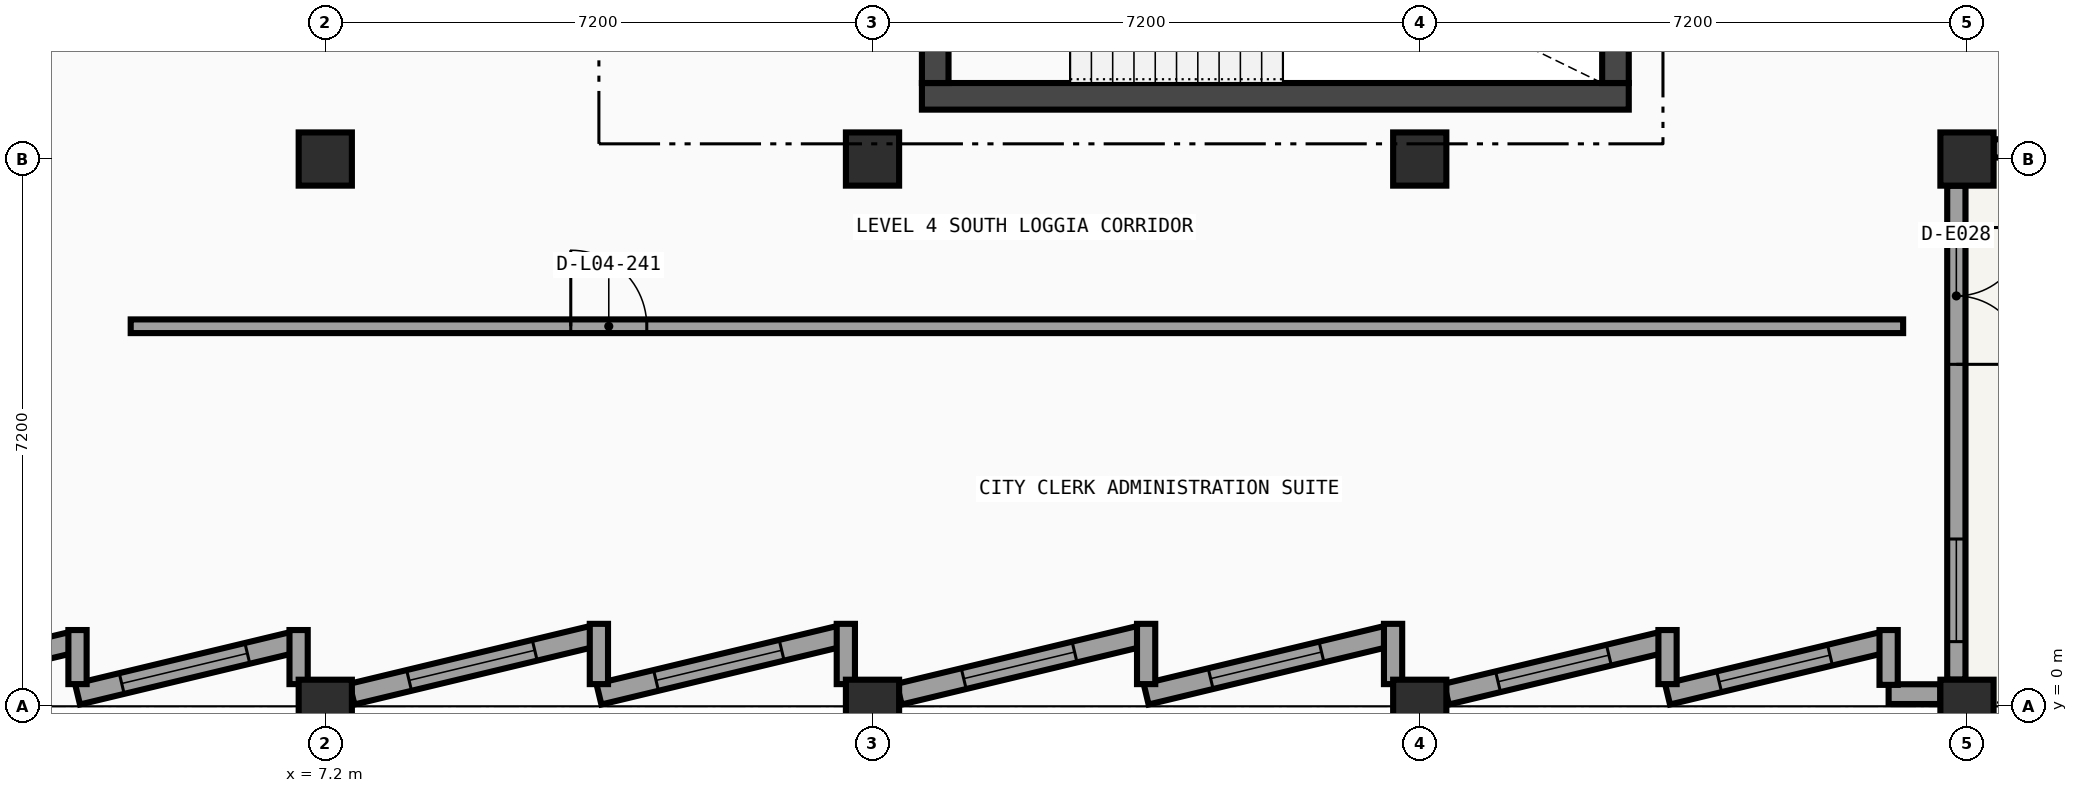
"""IFC4 building model, lengths in metres.
Left out: names, types, materials, properties, quantities, classifications, styles, units other than length and angle.
Written with IfcOpenShell. Run it as: python <this file> out.ifc"""

import sys

from ifc_helpers import new_model, si_unit, direction, frame, frame_2d, origin, origin_2d, place, context, subcontext, project, spatial, rectangle, extrude, element, fill, save


model = new_model("IFC4")
c1 = context("Model", 3, precision=1e-05, world=origin(), true_north=direction((0.0, 1.0)))
c2 = subcontext(c1, "Body", "Model", "MODEL_VIEW")
j1 = project(units=[si_unit("LENGTHUNIT", "METRE"), si_unit("PLANEANGLEUNIT", "RADIAN")], contexts=[c1])
p1 = place(None, origin())
s1 = spatial("IfcSite", under=j1, at=p1, CompositionType="ELEMENT")
p2 = place(p1, origin())
s2 = spatial("IfcBuilding", under=s1, at=p2, CompositionType="ELEMENT")
p3 = place(p2, frame((0.0, 0.0, 18.9)))
s3 = spatial("IfcBuildingStorey", under=s2, at=p3, CompositionType="ELEMENT", Elevation=18.9)
for number, where, z_axis, x_axis in (
    (1, (7.2, 0.0, 0.0), (0.0, 0.0, 1.0), (1.0, 0.0, 0.0)),
    (2, (7.2, 7.2, 0.0), (0.0, 0.0, 1.0), (1.0, 0.0, 0.0)),
    (3, (14.4, 0.0, 0.0), (0.0, 0.0, 1.0), (1.0, 0.0, 0.0)),
    (4, (14.4, 7.2, 0.0), (0.0, 0.0, 1.0), (1.0, 0.0, 0.0)),
    (5, (21.6, 0.0, 0.0), (0.0, 0.0, 1.0), (1.0, 0.0, 0.0)),
    (6, (21.6, 7.2, 0.0), (0.0, 0.0, 1.0), (1.0, 0.0, 0.0)),
    (7, (28.8, 0.0, 0.0), (0.0, 0.0, 1.0), (1.0, 0.0, 0.0)),
    (8, (28.8, 7.2, 0.0), (0.0, 0.0, 1.0), (1.0, 0.0, 0.0)),
):
    element("IfcColumn", number, at=place(p3, frame(where, z_axis=z_axis, x_axis=x_axis)), inside=s3, PredefinedType="COLUMN", context=c2, shape_type="SweptSolid", body=[
        extrude(rectangle(XDim=0.7, YDim=0.7, at=origin_2d()), origin(), (0.0, 0.0, 1.0), 4.05),
    ])
p4 = place(p3, frame((35.897, 7.34, 0.0), z_axis=(0.0, 0.0, 1.0), x_axis=(-1.0, 0.0, 0.0)))
e9 = element("IfcWall", 9, at=p4, inside=s3, PredefinedType="SOLIDWALL", context=c2, shape_type="SweptSolid", body=[
    extrude(rectangle(XDim=6.746, YDim=0.24, at=frame_2d((3.373, 0.0))), origin(), (0.0, 0.0, 1.0), 3.216),
])
p5 = place(p4, frame((0.55, 0.0, 0.0)))
e10 = element("IfcOpeningElement", 10, at=p5, cuts=e9, PredefinedType="OPENING", context=c2, shape_type="SweptSolid", body=[
    extrude(rectangle(XDim=1.8, YDim=2.15, at=frame_2d((0.9, 1.075))), frame((0.0, 0.13, 0.0), z_axis=(0.0, -1.0, 0.0), x_axis=(1.0, 0.0, 0.0)), (0.0, 0.0, 1.0), 0.26),
])
p6 = place(p4, frame((4.896, 0.0, 0.85)))
e11 = element("IfcOpeningElement", 11, at=p6, cuts=e9, PredefinedType="OPENING", context=c2, shape_type="SweptSolid", body=[
    extrude(rectangle(XDim=1.35, YDim=1.85, at=frame_2d((0.675, 0.925))), frame((0.0, 0.13, 0.0), z_axis=(0.0, -1.0, 0.0), x_axis=(1.0, 0.0, 0.0)), (0.0, 0.0, 1.0), 0.26),
])
p7 = place(p3, frame((28.66, 6.849, 0.0), z_axis=(0.0, 0.0, 1.0), x_axis=(0.0, -1.0, 0.0)))
e12 = element("IfcWall", 12, at=p7, inside=s3, PredefinedType="SOLIDWALL", context=c2, shape_type="SweptSolid", body=[
    extrude(rectangle(XDim=6.498, YDim=0.24, at=frame_2d((3.249, 0.0))), origin(), (0.0, 0.0, 1.0), 3.216),
])
p8 = place(p7, frame((0.55, 0.0, 0.0)))
e13 = element("IfcOpeningElement", 13, at=p8, cuts=e12, PredefinedType="OPENING", context=c2, shape_type="SweptSolid", body=[
    extrude(rectangle(XDim=1.8, YDim=2.15, at=frame_2d((0.9, 1.075))), frame((0.0, 0.13, 0.0), z_axis=(0.0, -1.0, 0.0), x_axis=(1.0, 0.0, 0.0)), (0.0, 0.0, 1.0), 0.26),
])
p9 = place(p7, frame((4.648, 0.0, 0.85)))
e14 = element("IfcOpeningElement", 14, at=p9, cuts=e12, PredefinedType="OPENING", context=c2, shape_type="SweptSolid", body=[
    extrude(rectangle(XDim=1.35, YDim=1.85, at=frame_2d((0.675, 0.925))), frame((0.0, 0.13, 0.0), z_axis=(0.0, -1.0, 0.0), x_axis=(1.0, 0.0, 0.0)), (0.0, 0.0, 1.0), 0.26),
])
p10 = place(p3, frame((28.449, 0.16, 0.0), z_axis=(0.0, 0.0, 1.0), x_axis=(-1.0, 0.0, 0.0)))
e15 = element("IfcWall", 15, at=p10, inside=s3, PredefinedType="SOLIDWALL", context=c2, shape_type="SweptSolid", body=[
    extrude(rectangle(XDim=0.68, YDim=0.26, at=frame_2d((0.34, 0.0))), origin(), (0.0, 0.0, 1.0), 3.216),
])
p11 = place(p3, frame((27.677, 0.836, 0.0), z_axis=(0.0, 0.0, 1.0), x_axis=(-0.9723612823, -0.23348134119, 0.0)))
e16 = element("IfcWall", 16, at=p11, inside=s3, PredefinedType="SOLIDWALL", context=c2, shape_type="SweptSolid", body=[
    extrude(rectangle(XDim=2.896, YDim=0.28, at=frame_2d((1.448, 0.0))), origin(), (0.0, 0.0, 1.0), 3.216),
])
p12 = place(p11, frame((0.698, 0.0, 0.8)))
e17 = element("IfcOpeningElement", 17, at=p12, cuts=e16, PredefinedType="OPENING", context=c2, shape_type="SweptSolid", body=[
    extrude(rectangle(XDim=1.5, YDim=1.7, at=frame_2d((0.75, 0.85))), frame((0.0, 0.15, 0.0), z_axis=(0.0, -1.0, 0.0), x_axis=(1.0, 0.0, 0.0)), (0.0, 0.0, 1.0), 0.3),
])
p13 = place(p3, frame((27.769, 1.003, 0.0), z_axis=(0.0, 0.0, 1.0), x_axis=(0.0, -1.0, 0.0)))
e18 = element("IfcWall", 18, at=p13, inside=s3, PredefinedType="SOLIDWALL", context=c2, shape_type="SweptSolid", body=[
    extrude(rectangle(XDim=0.721, YDim=0.24, at=frame_2d((0.361, 0.0))), origin(), (0.0, 0.0, 1.0), 3.8),
])
p14 = place(p3, frame((24.768, 0.836, 0.0), z_axis=(0.0, 0.0, 1.0), x_axis=(-0.972365876643, -0.233462206666, 0.0)))
e19 = element("IfcWall", 19, at=p14, inside=s3, PredefinedType="SOLIDWALL", context=c2, shape_type="SweptSolid", body=[
    extrude(rectangle(XDim=2.897, YDim=0.28, at=frame_2d((1.448, 0.0))), origin(), (0.0, 0.0, 1.0), 3.216),
])
p15 = place(p14, frame((0.698, 0.0, 0.8)))
e20 = element("IfcOpeningElement", 20, at=p15, cuts=e19, PredefinedType="OPENING", context=c2, shape_type="SweptSolid", body=[
    extrude(rectangle(XDim=1.5, YDim=1.7, at=frame_2d((0.75, 0.85))), frame((0.0, 0.15, 0.0), z_axis=(0.0, -1.0, 0.0), x_axis=(1.0, 0.0, 0.0)), (0.0, 0.0, 1.0), 0.3),
])
p16 = place(p3, frame((24.86, 1.003, 0.0), z_axis=(0.0, 0.0, 1.0), x_axis=(0.0, -1.0, 0.0)))
e21 = element("IfcWall", 21, at=p16, inside=s3, PredefinedType="SOLIDWALL", context=c2, shape_type="SweptSolid", body=[
    extrude(rectangle(XDim=0.711, YDim=0.24, at=frame_2d((0.356, 0.0))), origin(), (0.0, 0.0, 1.0), 3.8),
])
p17 = place(p3, frame((21.156, 0.918, 0.0), z_axis=(0.0, 0.0, 1.0), x_axis=(-0.972369549528, -0.233446908634, 0.0)))
e22 = element("IfcWall", 22, at=p17, inside=s3, PredefinedType="SOLIDWALL", context=c2, shape_type="SweptSolid", body=[
    extrude(rectangle(XDim=3.246, YDim=0.28, at=frame_2d((1.623, 0.0))), origin(), (0.0, 0.0, 1.0), 3.216),
])
p18 = place(p17, frame((0.873, 0.0, 0.8)))
e23 = element("IfcOpeningElement", 23, at=p18, cuts=e22, PredefinedType="OPENING", context=c2, shape_type="SweptSolid", body=[
    extrude(rectangle(XDim=1.5, YDim=1.7, at=frame_2d((0.75, 0.85))), frame((0.0, 0.15, 0.0), z_axis=(0.0, -1.0, 0.0), x_axis=(1.0, 0.0, 0.0)), (0.0, 0.0, 1.0), 0.3),
])
p19 = place(p3, frame((21.249, 1.085, 0.0), z_axis=(0.0, 0.0, 1.0), x_axis=(0.0, -1.0, 0.0)))
e24 = element("IfcWall", 24, at=p19, inside=s3, PredefinedType="SOLIDWALL", context=c2, shape_type="SweptSolid", body=[
    extrude(rectangle(XDim=0.793, YDim=0.24, at=frame_2d((0.396, 0.0))), origin(), (0.0, 0.0, 1.0), 3.8),
])
p20 = place(p3, frame((17.908, 0.918, 0.0), z_axis=(0.0, 0.0, 1.0), x_axis=(-0.972373647746, -0.233429837788, 0.0)))
e25 = element("IfcWall", 25, at=p20, inside=s3, PredefinedType="SOLIDWALL", context=c2, shape_type="SweptSolid", body=[
    extrude(rectangle(XDim=3.246, YDim=0.28, at=frame_2d((1.623, 0.0))), origin(), (0.0, 0.0, 1.0), 3.216),
])
p21 = place(p20, frame((0.873, 0.0, 0.8)))
e26 = element("IfcOpeningElement", 26, at=p21, cuts=e25, PredefinedType="OPENING", context=c2, shape_type="SweptSolid", body=[
    extrude(rectangle(XDim=1.5, YDim=1.7, at=frame_2d((0.75, 0.85))), frame((0.0, 0.15, 0.0), z_axis=(0.0, -1.0, 0.0), x_axis=(1.0, 0.0, 0.0)), (0.0, 0.0, 1.0), 0.3),
])
p22 = place(p3, frame((18.0, 1.085, 0.0), z_axis=(0.0, 0.0, 1.0), x_axis=(0.0, -1.0, 0.0)))
e27 = element("IfcWall", 27, at=p22, inside=s3, PredefinedType="SOLIDWALL", context=c2, shape_type="SweptSolid", body=[
    extrude(rectangle(XDim=0.793, YDim=0.24, at=frame_2d((0.396, 0.0))), origin(), (0.0, 0.0, 1.0), 3.8),
])
p23 = place(p3, frame((13.957, 0.918, 0.0), z_axis=(0.0, 0.0, 1.0), x_axis=(-0.972369549528, -0.233446908634, 0.0)))
e28 = element("IfcWall", 28, at=p23, inside=s3, PredefinedType="SOLIDWALL", context=c2, shape_type="SweptSolid", body=[
    extrude(rectangle(XDim=3.246, YDim=0.28, at=frame_2d((1.623, 0.0))), origin(), (0.0, 0.0, 1.0), 3.216),
])
p24 = place(p23, frame((0.773, 0.0, 0.8)))
e29 = element("IfcOpeningElement", 29, at=p24, cuts=e28, PredefinedType="OPENING", context=c2, shape_type="SweptSolid", body=[
    extrude(rectangle(XDim=1.7, YDim=1.85, at=frame_2d((0.85, 0.925))), frame((0.0, 0.15, 0.0), z_axis=(0.0, -1.0, 0.0), x_axis=(1.0, 0.0, 0.0)), (0.0, 0.0, 1.0), 0.3),
])
p25 = place(p3, frame((14.049, 1.085, 0.0), z_axis=(0.0, 0.0, 1.0), x_axis=(0.0, -1.0, 0.0)))
e30 = element("IfcWall", 30, at=p25, inside=s3, PredefinedType="SOLIDWALL", context=c2, shape_type="SweptSolid", body=[
    extrude(rectangle(XDim=0.793, YDim=0.24, at=frame_2d((0.396, 0.0))), origin(), (0.0, 0.0, 1.0), 3.8),
])
p26 = place(p3, frame((10.708, 0.918, 0.0), z_axis=(0.0, 0.0, 1.0), x_axis=(-0.972369549528, -0.233446908634, 0.0)))
e31 = element("IfcWall", 31, at=p26, inside=s3, PredefinedType="SOLIDWALL", context=c2, shape_type="SweptSolid", body=[
    extrude(rectangle(XDim=3.246, YDim=0.28, at=frame_2d((1.623, 0.0))), origin(), (0.0, 0.0, 1.0), 3.216),
])
p27 = place(p26, frame((0.773, 0.0, 0.8)))
e32 = element("IfcOpeningElement", 32, at=p27, cuts=e31, PredefinedType="OPENING", context=c2, shape_type="SweptSolid", body=[
    extrude(rectangle(XDim=1.7, YDim=1.85, at=frame_2d((0.85, 0.925))), frame((0.0, 0.15, 0.0), z_axis=(0.0, -1.0, 0.0), x_axis=(1.0, 0.0, 0.0)), (0.0, 0.0, 1.0), 0.3),
])
p28 = place(p3, frame((10.8, 1.085, 0.0), z_axis=(0.0, 0.0, 1.0), x_axis=(0.0, -1.0, 0.0)))
e33 = element("IfcWall", 33, at=p28, inside=s3, PredefinedType="SOLIDWALL", context=c2, shape_type="SweptSolid", body=[
    extrude(rectangle(XDim=0.793, YDim=0.24, at=frame_2d((0.396, 0.0))), origin(), (0.0, 0.0, 1.0), 3.8),
])
p29 = place(p3, frame((6.757, 0.836, 0.0), z_axis=(0.0, 0.0, 1.0), x_axis=(-0.972365876643, -0.233462206666, 0.0)))
e34 = element("IfcWall", 34, at=p29, inside=s3, PredefinedType="SOLIDWALL", context=c2, shape_type="SweptSolid", body=[
    extrude(rectangle(XDim=2.897, YDim=0.28, at=frame_2d((1.448, 0.0))), origin(), (0.0, 0.0, 1.0), 3.216),
])
p30 = place(p29, frame((0.598, 0.0, 0.8)))
e35 = element("IfcOpeningElement", 35, at=p30, cuts=e34, PredefinedType="OPENING", context=c2, shape_type="SweptSolid", body=[
    extrude(rectangle(XDim=1.7, YDim=1.85, at=frame_2d((0.85, 0.925))), frame((0.0, 0.15, 0.0), z_axis=(0.0, -1.0, 0.0), x_axis=(1.0, 0.0, 0.0)), (0.0, 0.0, 1.0), 0.3),
])
p31 = place(p3, frame((6.849, 1.003, 0.0), z_axis=(0.0, 0.0, 1.0), x_axis=(0.0, -1.0, 0.0)))
e36 = element("IfcWall", 36, at=p31, inside=s3, PredefinedType="SOLIDWALL", context=c2, shape_type="SweptSolid", body=[
    extrude(rectangle(XDim=0.711, YDim=0.24, at=frame_2d((0.356, 0.0))), origin(), (0.0, 0.0, 1.0), 3.8),
])
p32 = place(p3, frame((3.848, 0.836, 0.0), z_axis=(0.0, 0.0, 1.0), x_axis=(-0.972365876643, -0.233462206666, 0.0)))
e37 = element("IfcWall", 37, at=p32, inside=s3, PredefinedType="SOLIDWALL", context=c2, shape_type="SweptSolid", body=[
    extrude(rectangle(XDim=2.897, YDim=0.28, at=frame_2d((1.448, 0.0))), origin(), (0.0, 0.0, 1.0), 3.216),
])
p33 = place(p32, frame((0.598, 0.0, 0.8)))
e38 = element("IfcOpeningElement", 38, at=p33, cuts=e37, PredefinedType="OPENING", context=c2, shape_type="SweptSolid", body=[
    extrude(rectangle(XDim=1.7, YDim=1.85, at=frame_2d((0.85, 0.925))), frame((0.0, 0.15, 0.0), z_axis=(0.0, -1.0, 0.0), x_axis=(1.0, 0.0, 0.0)), (0.0, 0.0, 1.0), 0.3),
])
p34 = place(p3, frame((3.94, 1.003, 0.0), z_axis=(0.0, 0.0, 1.0), x_axis=(0.0, -1.0, 0.0)))
e39 = element("IfcWall", 39, at=p34, inside=s3, PredefinedType="SOLIDWALL", context=c2, shape_type="SweptSolid", body=[
    extrude(rectangle(XDim=0.711, YDim=0.24, at=frame_2d((0.356, 0.0))), origin(), (0.0, 0.0, 1.0), 3.8),
])
p35 = place(p3, frame((15.05, 8.025, 0.0), z_axis=(0.0, 0.0, 1.0), x_axis=(1.0, 0.0, 0.0)))
e40 = element("IfcWall", 40, at=p35, inside=s3, PredefinedType="SHEAR", context=c2, shape_type="SweptSolid", body=[
    extrude(rectangle(XDim=9.3, YDim=0.35, at=frame_2d((4.65, 0.0))), origin(), (0.0, 0.0, 1.0), 3.8),
])
p36 = place(p3, frame((15.225, 11.6, 0.0), z_axis=(0.0, 0.0, 1.0), x_axis=(0.0, -1.0, 0.0)))
e41 = element("IfcWall", 41, at=p36, inside=s3, PredefinedType="SHEAR", context=c2, shape_type="SweptSolid", body=[
    extrude(rectangle(XDim=3.4, YDim=0.35, at=frame_2d((1.7, 0.0))), origin(), (0.0, 0.0, 1.0), 3.8),
])
p37 = place(p36, frame((1.125, 0.0, 0.0)))
e42 = element("IfcOpeningElement", 42, at=p37, cuts=e41, PredefinedType="OPENING", context=c2, shape_type="SweptSolid", body=[
    extrude(rectangle(XDim=1.15, YDim=2.1, at=frame_2d((0.575, 1.05))), frame((0.0, 0.185, 0.0), z_axis=(0.0, -1.0, 0.0), x_axis=(1.0, 0.0, 0.0)), (0.0, 0.0, 1.0), 0.37),
])
p38 = place(p3, frame((24.175, 8.2, 0.0), z_axis=(0.0, 0.0, 1.0), x_axis=(0.0, 1.0, 0.0)))
e43 = element("IfcWall", 43, at=p38, inside=s3, PredefinedType="SHEAR", context=c2, shape_type="SweptSolid", body=[
    extrude(rectangle(XDim=3.4, YDim=0.35, at=frame_2d((1.7, 0.0))), origin(), (0.0, 0.0, 1.0), 3.8),
])
p39 = place(p3, frame((4.64, 5.0, 0.0), z_axis=(0.0, 0.0, 1.0), x_axis=(1.0, 0.0, 0.0)))
e44 = element("IfcWall", 44, at=p39, inside=s3, PredefinedType="PARTITIONING", context=c2, shape_type="SweptSolid", body=[
    extrude(rectangle(XDim=23.32, YDim=0.18, at=frame_2d((11.66, 0.0))), origin(), (0.0, 0.0, 1.0), 3.206),
])
p40 = place(p39, frame((5.79, 0.0, 0.0)))
e45 = element("IfcOpeningElement", 45, at=p40, cuts=e44, PredefinedType="OPENING", context=c2, shape_type="SweptSolid", body=[
    extrude(rectangle(XDim=1.0, YDim=2.1, at=frame_2d((0.5, 1.05))), frame((0.0, 0.1, 0.0), z_axis=(0.0, -1.0, 0.0), x_axis=(1.0, 0.0, 0.0)), (0.0, 0.0, 1.0), 0.2),
])
p41 = place(p8, origin())
e46 = element("IfcDoor", 46, at=p41, inside=s3, OperationType="DOUBLE_DOOR_SINGLE_SWING", PredefinedType="DOOR", context=c2, shape_type="SweptSolid", body=[
    extrude(rectangle(XDim=1.8, YDim=2.15, at=frame_2d((0.9, 1.075))), frame((0.0, 0.025, 0.0), z_axis=(0.0, -1.0, 0.0), x_axis=(1.0, 0.0, 0.0)), (0.0, 0.0, 1.0), 0.05),
])
fill(e13, e46)
p42 = place(p9, origin())
e47 = element("IfcWindow", 47, at=p42, inside=s3, PartitioningType="SINGLE_PANEL", PredefinedType="WINDOW", context=c2, shape_type="SweptSolid", body=[
    extrude(rectangle(XDim=1.35, YDim=1.85, at=frame_2d((0.675, 0.925))), frame((0.0, 0.03, 0.0), z_axis=(0.0, -1.0, 0.0), x_axis=(1.0, 0.0, 0.0)), (0.0, 0.0, 1.0), 0.06),
])
fill(e14, e47)
p43 = place(p12, origin())
e48 = element("IfcWindow", 48, at=p43, inside=s3, PartitioningType="SINGLE_PANEL", PredefinedType="WINDOW", context=c2, shape_type="SweptSolid", body=[
    extrude(rectangle(XDim=1.5, YDim=1.7, at=frame_2d((0.75, 0.85))), frame((0.0, 0.03, 0.0), z_axis=(0.0, -1.0, 0.0), x_axis=(1.0, 0.0, 0.0)), (0.0, 0.0, 1.0), 0.06),
])
fill(e17, e48)
p44 = place(p15, origin())
e49 = element("IfcWindow", 49, at=p44, inside=s3, PartitioningType="SINGLE_PANEL", PredefinedType="WINDOW", context=c2, shape_type="SweptSolid", body=[
    extrude(rectangle(XDim=1.5, YDim=1.7, at=frame_2d((0.75, 0.85))), frame((0.0, 0.03, 0.0), z_axis=(0.0, -1.0, 0.0), x_axis=(1.0, 0.0, 0.0)), (0.0, 0.0, 1.0), 0.06),
])
fill(e20, e49)
p45 = place(p18, origin())
e50 = element("IfcWindow", 50, at=p45, inside=s3, PartitioningType="SINGLE_PANEL", PredefinedType="WINDOW", context=c2, shape_type="SweptSolid", body=[
    extrude(rectangle(XDim=1.5, YDim=1.7, at=frame_2d((0.75, 0.85))), frame((0.0, 0.03, 0.0), z_axis=(0.0, -1.0, 0.0), x_axis=(1.0, 0.0, 0.0)), (0.0, 0.0, 1.0), 0.06),
])
fill(e23, e50)
p46 = place(p21, origin())
e51 = element("IfcWindow", 51, at=p46, inside=s3, PartitioningType="SINGLE_PANEL", PredefinedType="WINDOW", context=c2, shape_type="SweptSolid", body=[
    extrude(rectangle(XDim=1.5, YDim=1.7, at=frame_2d((0.75, 0.85))), frame((0.0, 0.03, 0.0), z_axis=(0.0, -1.0, 0.0), x_axis=(1.0, 0.0, 0.0)), (0.0, 0.0, 1.0), 0.06),
])
fill(e26, e51)
p47 = place(p24, origin())
e52 = element("IfcWindow", 52, at=p47, inside=s3, PartitioningType="SINGLE_PANEL", PredefinedType="WINDOW", context=c2, shape_type="SweptSolid", body=[
    extrude(rectangle(XDim=1.7, YDim=1.85, at=frame_2d((0.85, 0.925))), frame((0.0, 0.03, 0.0), z_axis=(0.0, -1.0, 0.0), x_axis=(1.0, 0.0, 0.0)), (0.0, 0.0, 1.0), 0.06),
])
fill(e29, e52)
p48 = place(p27, origin())
e53 = element("IfcWindow", 53, at=p48, inside=s3, PartitioningType="SINGLE_PANEL", PredefinedType="WINDOW", context=c2, shape_type="SweptSolid", body=[
    extrude(rectangle(XDim=1.7, YDim=1.85, at=frame_2d((0.85, 0.925))), frame((0.0, 0.03, 0.0), z_axis=(0.0, -1.0, 0.0), x_axis=(1.0, 0.0, 0.0)), (0.0, 0.0, 1.0), 0.06),
])
fill(e32, e53)
p49 = place(p30, origin())
e54 = element("IfcWindow", 54, at=p49, inside=s3, PartitioningType="SINGLE_PANEL", PredefinedType="WINDOW", context=c2, shape_type="SweptSolid", body=[
    extrude(rectangle(XDim=1.7, YDim=1.85, at=frame_2d((0.85, 0.925))), frame((0.0, 0.03, 0.0), z_axis=(0.0, -1.0, 0.0), x_axis=(1.0, 0.0, 0.0)), (0.0, 0.0, 1.0), 0.06),
])
fill(e35, e54)
p50 = place(p40, origin())
e55 = element("IfcDoor", 55, at=p50, inside=s3, OperationType="SINGLE_SWING_LEFT", PredefinedType="DOOR", context=c2, shape_type="SweptSolid", body=[
    extrude(rectangle(XDim=1.0, YDim=2.1, at=frame_2d((0.5, 1.05))), frame((0.0, 0.025, 0.0), z_axis=(0.0, -1.0, 0.0), x_axis=(1.0, 0.0, 0.0)), (0.0, 0.0, 1.0), 0.05),
])
fill(e45, e55)
save(model, sys.argv[1])
